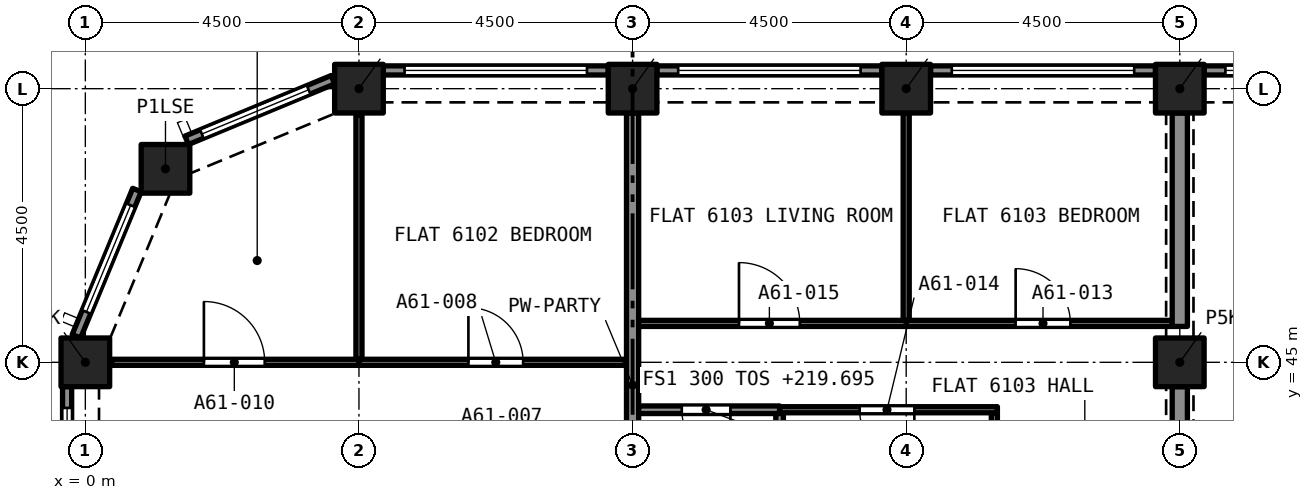
"""IFC4 building model, lengths in metres.
Left out: names, types, materials, properties, quantities, classifications, styles, units other than length and angle.
Written with IfcOpenShell. Run it as: python <this file> out.ifc"""

import sys

from ifc_helpers import new_model, si_unit, direction, frame, frame_2d, origin, origin_2d, place, context, subcontext, project, spatial, rectangle, extrude, element, fill, save


model = new_model("IFC4")
c1 = context("Model", 3, precision=1e-05, world=origin(), true_north=direction((0.0, 1.0)))
c2 = subcontext(c1, "Body", "Model", "MODEL_VIEW")
j1 = project(units=[si_unit("LENGTHUNIT", "METRE"), si_unit("PLANEANGLEUNIT", "RADIAN")], contexts=[c1])
p1 = place(None, origin())
s1 = spatial("IfcSite", under=j1, at=p1, CompositionType="ELEMENT")
p2 = place(p1, origin())
s2 = spatial("IfcBuilding", under=s1, at=p2, CompositionType="ELEMENT")
p3 = place(p2, frame((0.0, 0.0, 219.695)))
s3 = spatial("IfcBuildingStorey", under=s2, at=p3, CompositionType="ELEMENT", Elevation=219.695)
for number, where, z_axis, x_axis in (
    (1, (0.0, 45.0, 0.0), (0.0, 0.0, 1.0), (1.0, 0.0, 0.0)),
    (2, (18.0, 45.0, 0.0), (0.0, 0.0, 1.0), (1.0, 0.0, 0.0)),
    (3, (1.318, 48.182, 0.0), (0.0, 0.0, 1.0), (1.0, 0.0, 0.0)),
    (4, (4.5, 49.5, 0.0), (0.0, 0.0, 1.0), (1.0, 0.0, 0.0)),
    (5, (9.0, 49.5, 0.0), (0.0, 0.0, 1.0), (1.0, 0.0, 0.0)),
    (6, (13.5, 49.5, 0.0), (0.0, 0.0, 1.0), (1.0, 0.0, 0.0)),
    (7, (18.0, 49.5, 0.0), (0.0, 0.0, 1.0), (1.0, 0.0, 0.0)),
):
    element("IfcColumn", number, at=place(p3, frame(where, z_axis=z_axis, x_axis=x_axis)), inside=s3, PredefinedType="COLUMN", context=c2, shape_type="SweptSolid", body=[
        extrude(rectangle(XDim=0.8, YDim=0.8, at=origin_2d()), origin(), (0.0, 0.0, 1.0), 3.2),
    ])
p4 = place(p3, frame((18.4, 49.8, 0.0), z_axis=(0.0, 0.0, 1.0), x_axis=(1.0, 0.0, 0.0)))
e8 = element("IfcWall", 8, at=p4, inside=s3, PredefinedType="SOLIDWALL", context=c2, shape_type="SweptSolid", body=[
    extrude(rectangle(XDim=3.7, YDim=0.15, at=frame_2d((1.85, 0.0))), origin(), (0.0, 0.0, 1.0), 3.2),
])
p5 = place(p4, frame((0.35, 0.0, 0.45)))
e9 = element("IfcOpeningElement", 9, at=p5, cuts=e8, PredefinedType="OPENING", context=c2, shape_type="SweptSolid", body=[
    extrude(rectangle(XDim=3.0, YDim=1.95, at=frame_2d((1.5, 0.975))), frame((0.0, 0.085, 0.0), z_axis=(0.0, -1.0, 0.0), x_axis=(1.0, 0.0, 0.0)), (0.0, 0.0, 1.0), 0.17),
])
p6 = place(p3, frame((13.9, 49.8, 0.0), z_axis=(0.0, 0.0, 1.0), x_axis=(1.0, 0.0, 0.0)))
e10 = element("IfcWall", 10, at=p6, inside=s3, PredefinedType="SOLIDWALL", context=c2, shape_type="SweptSolid", body=[
    extrude(rectangle(XDim=3.7, YDim=0.15, at=frame_2d((1.85, 0.0))), origin(), (0.0, 0.0, 1.0), 3.2),
])
p7 = place(p6, frame((0.35, 0.0, 0.45)))
e11 = element("IfcOpeningElement", 11, at=p7, cuts=e10, PredefinedType="OPENING", context=c2, shape_type="SweptSolid", body=[
    extrude(rectangle(XDim=3.0, YDim=1.95, at=frame_2d((1.5, 0.975))), frame((0.0, 0.085, 0.0), z_axis=(0.0, -1.0, 0.0), x_axis=(1.0, 0.0, 0.0)), (0.0, 0.0, 1.0), 0.17),
])
p8 = place(p3, frame((9.4, 49.8, 0.0), z_axis=(0.0, 0.0, 1.0), x_axis=(1.0, 0.0, 0.0)))
e12 = element("IfcWall", 12, at=p8, inside=s3, PredefinedType="SOLIDWALL", context=c2, shape_type="SweptSolid", body=[
    extrude(rectangle(XDim=3.7, YDim=0.15, at=frame_2d((1.85, 0.0))), origin(), (0.0, 0.0, 1.0), 3.2),
])
p9 = place(p8, frame((0.35, 0.0, 0.45)))
e13 = element("IfcOpeningElement", 13, at=p9, cuts=e12, PredefinedType="OPENING", context=c2, shape_type="SweptSolid", body=[
    extrude(rectangle(XDim=3.0, YDim=1.95, at=frame_2d((1.5, 0.975))), frame((0.0, 0.085, 0.0), z_axis=(0.0, -1.0, 0.0), x_axis=(1.0, 0.0, 0.0)), (0.0, 0.0, 1.0), 0.17),
])
p10 = place(p3, frame((4.9, 49.8, 0.0), z_axis=(0.0, 0.0, 1.0), x_axis=(1.0, 0.0, 0.0)))
e14 = element("IfcWall", 14, at=p10, inside=s3, PredefinedType="SOLIDWALL", context=c2, shape_type="SweptSolid", body=[
    extrude(rectangle(XDim=3.7, YDim=0.15, at=frame_2d((1.85, 0.0))), origin(), (0.0, 0.0, 1.0), 3.2),
])
p11 = place(p10, frame((0.35, 0.0, 0.45)))
e15 = element("IfcOpeningElement", 15, at=p11, cuts=e14, PredefinedType="OPENING", context=c2, shape_type="SweptSolid", body=[
    extrude(rectangle(XDim=3.0, YDim=1.95, at=frame_2d((1.5, 0.975))), frame((0.0, 0.085, 0.0), z_axis=(0.0, -1.0, 0.0), x_axis=(1.0, 0.0, 0.0)), (0.0, 0.0, 1.0), 0.17),
])
p12 = place(p3, frame((1.667, 48.651, 0.0), z_axis=(0.0, 0.0, 1.0), x_axis=(0.923885342263, 0.382669406082, 0.0)))
e16 = element("IfcWall", 16, at=p12, inside=s3, PredefinedType="SOLIDWALL", context=c2, shape_type="SweptSolid", body=[
    extrude(rectangle(XDim=2.602, YDim=0.15, at=frame_2d((1.301, 0.0))), origin(), (0.0, 0.0, 1.0), 3.2),
])
p13 = place(p12, frame((0.27, 0.0, 0.45)))
e17 = element("IfcOpeningElement", 17, at=p13, cuts=e16, PredefinedType="OPENING", context=c2, shape_type="SweptSolid", body=[
    extrude(rectangle(XDim=1.9, YDim=1.95, at=frame_2d((0.95, 0.975))), frame((0.0, 0.085, 0.0), z_axis=(0.0, -1.0, 0.0), x_axis=(1.0, 0.0, 0.0)), (0.0, 0.0, 1.0), 0.17),
])
p14 = place(p3, frame((-0.147, 45.429, 0.0), z_axis=(0.0, 0.0, 1.0), x_axis=(0.382669406082, 0.923885342263, 0.0)))
e18 = element("IfcWall", 18, at=p14, inside=s3, PredefinedType="SOLIDWALL", context=c2, shape_type="SweptSolid", body=[
    extrude(rectangle(XDim=2.602, YDim=0.15, at=frame_2d((1.301, 0.0))), origin(), (0.0, 0.0, 1.0), 3.2),
])
p15 = place(p14, frame((0.432, 0.0, 0.45)))
e19 = element("IfcOpeningElement", 19, at=p15, cuts=e18, PredefinedType="OPENING", context=c2, shape_type="SweptSolid", body=[
    extrude(rectangle(XDim=1.9, YDim=1.95, at=frame_2d((0.95, 0.975))), frame((0.0, 0.085, 0.0), z_axis=(0.0, -1.0, 0.0), x_axis=(1.0, 0.0, 0.0)), (0.0, 0.0, 1.0), 0.17),
])
p16 = place(p3, frame((-0.3, 40.9, 0.0), z_axis=(0.0, 0.0, 1.0), x_axis=(0.0, 1.0, 0.0)))
e20 = element("IfcWall", 20, at=p16, inside=s3, PredefinedType="SOLIDWALL", context=c2, shape_type="SweptSolid", body=[
    extrude(rectangle(XDim=3.7, YDim=0.15, at=frame_2d((1.85, 0.0))), origin(), (0.0, 0.0, 1.0), 3.2),
])
p17 = place(p16, frame((0.35, 0.0, 0.45)))
e21 = element("IfcOpeningElement", 21, at=p17, cuts=e20, PredefinedType="OPENING", context=c2, shape_type="SweptSolid", body=[
    extrude(rectangle(XDim=3.0, YDim=1.95, at=frame_2d((1.5, 0.975))), frame((0.0, 0.085, 0.0), z_axis=(0.0, -1.0, 0.0), x_axis=(1.0, 0.0, 0.0)), (0.0, 0.0, 1.0), 0.17),
])
p18 = place(p3, frame((4.5, 45.0, 0.0), z_axis=(0.0, 0.0, 1.0), x_axis=(1.0, 0.0, 0.0)))
e22 = element("IfcWall", 22, at=p18, inside=s3, PredefinedType="PARTITIONING", context=c2, shape_type="SweptSolid", body=[
    extrude(rectangle(XDim=4.4, YDim=0.1, at=frame_2d((2.2, 0.0))), origin(), (0.0, 0.0, 1.0), 2.9),
])
p19 = place(p18, frame((1.8, 0.0, 0.0)))
e23 = element("IfcOpeningElement", 23, at=p19, cuts=e22, PredefinedType="OPENING", context=c2, shape_type="SweptSolid", body=[
    extrude(rectangle(XDim=0.9, YDim=2.1, at=frame_2d((0.45, 1.05))), frame((0.0, 0.06, 0.0), z_axis=(0.0, -1.0, 0.0), x_axis=(1.0, 0.0, 0.0)), (0.0, 0.0, 1.0), 0.12),
])
p20 = place(p3, frame((4.5, 45.05, 0.0), z_axis=(0.0, 0.0, 1.0), x_axis=(0.0, 1.0, 0.0)))
e24 = element("IfcWall", 24, at=p20, inside=s3, PredefinedType="PARTITIONING", context=c2, shape_type="SweptSolid", body=[
    extrude(rectangle(XDim=4.017, YDim=0.1, at=frame_2d((2.009, 0.0))), origin(), (0.0, 0.0, 1.0), 2.9),
])
p21 = place(p3, frame((0.433, 45.0, 0.0), z_axis=(0.0, 0.0, 1.0), x_axis=(1.0, 0.0, 0.0)))
e25 = element("IfcWall", 25, at=p21, inside=s3, PredefinedType="PARTITIONING", context=c2, shape_type="SweptSolid", body=[
    extrude(rectangle(XDim=4.067, YDim=0.1, at=frame_2d((2.034, 0.0))), origin(), (0.0, 0.0, 1.0), 2.9),
])
p22 = place(p21, frame((1.517, 0.0, 0.0)))
e26 = element("IfcOpeningElement", 26, at=p22, cuts=e25, PredefinedType="OPENING", context=c2, shape_type="SweptSolid", body=[
    extrude(rectangle(XDim=1.0, YDim=2.1, at=frame_2d((0.5, 1.05))), frame((0.0, 0.06, 0.0), z_axis=(0.0, -1.0, 0.0), x_axis=(1.0, 0.0, 0.0)), (0.0, 0.0, 1.0), 0.12),
])
p23 = place(p3, frame((9.0, 40.15, 0.0), z_axis=(0.0, 0.0, 1.0), x_axis=(0.0, 1.0, 0.0)))
e27 = element("IfcWall", 27, at=p23, inside=s3, PredefinedType="PARTITIONING", context=c2, shape_type="SweptSolid", body=[
    extrude(rectangle(XDim=8.95, YDim=0.2, at=frame_2d((4.475, 0.0))), origin(), (0.0, 0.0, 1.0), 2.9),
])
p24 = place(p3, frame((11.418, 44.22, 0.0), z_axis=(0.0, 0.0, 1.0), x_axis=(-1.0, 0.0, 0.0)))
e28 = element("IfcWall", 28, at=p24, inside=s3, PredefinedType="PARTITIONING", context=c2, shape_type="SweptSolid", body=[
    extrude(rectangle(XDim=2.318, YDim=0.125, at=frame_2d((1.159, 0.0))), origin(), (0.0, 0.0, 1.0), 2.9),
])
p25 = place(p24, frame((0.809, 0.0, 0.0)))
e29 = element("IfcOpeningElement", 29, at=p25, cuts=e28, PredefinedType="OPENING", context=c2, shape_type="SweptSolid", body=[
    extrude(rectangle(XDim=0.8, YDim=2.1, at=frame_2d((0.4, 1.05))), frame((0.0, 0.073, 0.0), z_axis=(0.0, -1.0, 0.0), x_axis=(1.0, 0.0, 0.0)), (0.0, 0.0, 1.0), 0.145),
])
p26 = place(p3, frame((11.418, 40.15, 0.0), z_axis=(0.0, 0.0, 1.0), x_axis=(0.0, 1.0, 0.0)))
e30 = element("IfcWall", 30, at=p26, inside=s3, PredefinedType="PARTITIONING", context=c2, shape_type="SweptSolid", body=[
    extrude(rectangle(XDim=4.008, YDim=0.125, at=frame_2d((2.004, 0.0))), origin(), (0.0, 0.0, 1.0), 2.9),
])
p27 = place(p3, frame((13.5, 45.64, 0.0), z_axis=(0.0, 0.0, 1.0), x_axis=(1.0, 0.0, 0.0)))
e31 = element("IfcWall", 31, at=p27, inside=s3, PredefinedType="PARTITIONING", context=c2, shape_type="SweptSolid", body=[
    extrude(rectangle(XDim=4.375, YDim=0.1, at=frame_2d((2.188, 0.0))), origin(), (0.0, 0.0, 1.0), 2.9),
])
p28 = place(p27, frame((1.8, 0.0, 0.0)))
e32 = element("IfcOpeningElement", 32, at=p28, cuts=e31, PredefinedType="OPENING", context=c2, shape_type="SweptSolid", body=[
    extrude(rectangle(XDim=0.9, YDim=2.1, at=frame_2d((0.45, 1.05))), frame((0.0, 0.06, 0.0), z_axis=(0.0, -1.0, 0.0), x_axis=(1.0, 0.0, 0.0)), (0.0, 0.0, 1.0), 0.12),
])
p29 = place(p3, frame((13.5, 45.69, 0.0), z_axis=(0.0, 0.0, 1.0), x_axis=(0.0, 1.0, 0.0)))
e33 = element("IfcWall", 33, at=p29, inside=s3, PredefinedType="PARTITIONING", context=c2, shape_type="SweptSolid", body=[
    extrude(rectangle(XDim=3.41, YDim=0.1, at=frame_2d((1.705, 0.0))), origin(), (0.0, 0.0, 1.0), 2.9),
])
p30 = place(p3, frame((18.0, 45.59, 0.0), z_axis=(0.0, 0.0, 1.0), x_axis=(0.0, 1.0, 0.0)))
e34 = element("IfcWall", 34, at=p30, inside=s3, PredefinedType="PARTITIONING", context=c2, shape_type="SweptSolid", body=[
    extrude(rectangle(XDim=3.51, YDim=0.25, at=frame_2d((1.755, 0.0))), origin(), (0.0, 0.0, 1.0), 2.38),
])
p31 = place(p3, frame((14.95, 40.225, 0.0), z_axis=(0.0, 0.0, 1.0), x_axis=(0.0, 1.0, 0.0)))
e35 = element("IfcWall", 35, at=p31, inside=s3, PredefinedType="PARTITIONING", context=c2, shape_type="SweptSolid", body=[
    extrude(rectangle(XDim=3.945, YDim=0.1, at=frame_2d((1.972, 0.0))), origin(), (0.0, 0.0, 1.0), 2.9),
])
p32 = place(p3, frame((15.0, 44.22, 0.0), z_axis=(0.0, 0.0, 1.0), x_axis=(-1.0, 0.0, 0.0)))
e36 = element("IfcWall", 36, at=p32, inside=s3, PredefinedType="PARTITIONING", context=c2, shape_type="SweptSolid", body=[
    extrude(rectangle(XDim=3.582, YDim=0.1, at=frame_2d((1.791, 0.0))), origin(), (0.0, 0.0, 1.0), 2.9),
])
p33 = place(p32, frame((1.366, 0.0, 0.0)))
e37 = element("IfcOpeningElement", 37, at=p33, cuts=e36, PredefinedType="OPENING", context=c2, shape_type="SweptSolid", body=[
    extrude(rectangle(XDim=0.9, YDim=2.1, at=frame_2d((0.45, 1.05))), frame((0.0, 0.06, 0.0), z_axis=(0.0, -1.0, 0.0), x_axis=(1.0, 0.0, 0.0)), (0.0, 0.0, 1.0), 0.12),
])
p34 = place(p3, frame((9.1, 45.64, 0.0), z_axis=(0.0, 0.0, 1.0), x_axis=(1.0, 0.0, 0.0)))
e38 = element("IfcWall", 38, at=p34, inside=s3, PredefinedType="PARTITIONING", context=c2, shape_type="SweptSolid", body=[
    extrude(rectangle(XDim=4.4, YDim=0.1, at=frame_2d((2.2, 0.0))), origin(), (0.0, 0.0, 1.0), 2.9),
])
p35 = place(p34, frame((1.65, 0.0, 0.0)))
e39 = element("IfcOpeningElement", 39, at=p35, cuts=e38, PredefinedType="OPENING", context=c2, shape_type="SweptSolid", body=[
    extrude(rectangle(XDim=1.0, YDim=2.1, at=frame_2d((0.5, 1.05))), frame((0.0, 0.06, 0.0), z_axis=(0.0, -1.0, 0.0), x_axis=(1.0, 0.0, 0.0)), (0.0, 0.0, 1.0), 0.12),
])
p36 = place(p3, frame((18.0, 40.9, 0.0), z_axis=(0.0, 0.0, 1.0), x_axis=(0.0, 1.0, 0.0)))
e40 = element("IfcWall", 40, at=p36, inside=s3, PredefinedType="PARTITIONING", context=c2, shape_type="SweptSolid", body=[
    extrude(rectangle(XDim=3.7, YDim=0.25, at=frame_2d((1.85, 0.0))), origin(), (0.0, 0.0, 1.0), 2.38),
])
p37 = place(p5, origin())
e41 = element("IfcWindow", 41, at=p37, inside=s3, PartitioningType="SINGLE_PANEL", PredefinedType="WINDOW", context=c2, shape_type="SweptSolid", body=[
    extrude(rectangle(XDim=3.0, YDim=1.95, at=frame_2d((1.5, 0.975))), frame((0.0, 0.03, 0.0), z_axis=(0.0, -1.0, 0.0), x_axis=(1.0, 0.0, 0.0)), (0.0, 0.0, 1.0), 0.06),
])
fill(e9, e41)
p38 = place(p7, origin())
e42 = element("IfcWindow", 42, at=p38, inside=s3, PartitioningType="SINGLE_PANEL", PredefinedType="WINDOW", context=c2, shape_type="SweptSolid", body=[
    extrude(rectangle(XDim=3.0, YDim=1.95, at=frame_2d((1.5, 0.975))), frame((0.0, 0.03, 0.0), z_axis=(0.0, -1.0, 0.0), x_axis=(1.0, 0.0, 0.0)), (0.0, 0.0, 1.0), 0.06),
])
fill(e11, e42)
p39 = place(p9, origin())
e43 = element("IfcWindow", 43, at=p39, inside=s3, PartitioningType="SINGLE_PANEL", PredefinedType="WINDOW", context=c2, shape_type="SweptSolid", body=[
    extrude(rectangle(XDim=3.0, YDim=1.95, at=frame_2d((1.5, 0.975))), frame((0.0, 0.03, 0.0), z_axis=(0.0, -1.0, 0.0), x_axis=(1.0, 0.0, 0.0)), (0.0, 0.0, 1.0), 0.06),
])
fill(e13, e43)
p40 = place(p11, origin())
e44 = element("IfcWindow", 44, at=p40, inside=s3, PartitioningType="SINGLE_PANEL", PredefinedType="WINDOW", context=c2, shape_type="SweptSolid", body=[
    extrude(rectangle(XDim=3.0, YDim=1.95, at=frame_2d((1.5, 0.975))), frame((0.0, 0.03, 0.0), z_axis=(0.0, -1.0, 0.0), x_axis=(1.0, 0.0, 0.0)), (0.0, 0.0, 1.0), 0.06),
])
fill(e15, e44)
p41 = place(p13, origin())
e45 = element("IfcWindow", 45, at=p41, inside=s3, PartitioningType="SINGLE_PANEL", PredefinedType="WINDOW", context=c2, shape_type="SweptSolid", body=[
    extrude(rectangle(XDim=1.9, YDim=1.95, at=frame_2d((0.95, 0.975))), frame((0.0, 0.03, 0.0), z_axis=(0.0, -1.0, 0.0), x_axis=(1.0, 0.0, 0.0)), (0.0, 0.0, 1.0), 0.06),
])
fill(e17, e45)
p42 = place(p15, origin())
e46 = element("IfcWindow", 46, at=p42, inside=s3, PartitioningType="SINGLE_PANEL", PredefinedType="WINDOW", context=c2, shape_type="SweptSolid", body=[
    extrude(rectangle(XDim=1.9, YDim=1.95, at=frame_2d((0.95, 0.975))), frame((0.0, 0.03, 0.0), z_axis=(0.0, -1.0, 0.0), x_axis=(1.0, 0.0, 0.0)), (0.0, 0.0, 1.0), 0.06),
])
fill(e19, e46)
p43 = place(p17, origin())
e47 = element("IfcWindow", 47, at=p43, inside=s3, PartitioningType="SINGLE_PANEL", PredefinedType="WINDOW", context=c2, shape_type="SweptSolid", body=[
    extrude(rectangle(XDim=3.0, YDim=1.95, at=frame_2d((1.5, 0.975))), frame((0.0, 0.03, 0.0), z_axis=(0.0, -1.0, 0.0), x_axis=(1.0, 0.0, 0.0)), (0.0, 0.0, 1.0), 0.06),
])
fill(e21, e47)
p44 = place(p19, origin())
e48 = element("IfcDoor", 48, at=p44, inside=s3, OperationType="SINGLE_SWING_RIGHT", PredefinedType="DOOR", context=c2, shape_type="SweptSolid", body=[
    extrude(rectangle(XDim=0.9, YDim=2.1, at=frame_2d((0.45, 1.05))), frame((0.0, 0.025, 0.0), z_axis=(0.0, -1.0, 0.0), x_axis=(1.0, 0.0, 0.0)), (0.0, 0.0, 1.0), 0.05),
])
fill(e23, e48)
p45 = place(p22, origin())
e49 = element("IfcDoor", 49, at=p45, inside=s3, OperationType="SINGLE_SWING_LEFT", PredefinedType="DOOR", context=c2, shape_type="SweptSolid", body=[
    extrude(rectangle(XDim=1.0, YDim=2.1, at=frame_2d((0.5, 1.05))), frame((0.0, 0.025, 0.0), z_axis=(0.0, -1.0, 0.0), x_axis=(1.0, 0.0, 0.0)), (0.0, 0.0, 1.0), 0.05),
])
fill(e26, e49)
p46 = place(p25, origin())
e50 = element("IfcDoor", 50, at=p46, inside=s3, OperationType="SINGLE_SWING_RIGHT", PredefinedType="DOOR", context=c2, shape_type="SweptSolid", body=[
    extrude(rectangle(XDim=0.8, YDim=2.1, at=frame_2d((0.4, 1.05))), frame((0.0, 0.025, 0.0), z_axis=(0.0, -1.0, 0.0), x_axis=(1.0, 0.0, 0.0)), (0.0, 0.0, 1.0), 0.05),
])
fill(e29, e50)
p47 = place(p28, origin())
e51 = element("IfcDoor", 51, at=p47, inside=s3, OperationType="SINGLE_SWING_RIGHT", PredefinedType="DOOR", context=c2, shape_type="SweptSolid", body=[
    extrude(rectangle(XDim=0.9, YDim=2.1, at=frame_2d((0.45, 1.05))), frame((0.0, 0.025, 0.0), z_axis=(0.0, -1.0, 0.0), x_axis=(1.0, 0.0, 0.0)), (0.0, 0.0, 1.0), 0.05),
])
fill(e32, e51)
p48 = place(p33, origin())
e52 = element("IfcDoor", 52, at=p48, inside=s3, OperationType="SINGLE_SWING_RIGHT", PredefinedType="DOOR", context=c2, shape_type="SweptSolid", body=[
    extrude(rectangle(XDim=0.9, YDim=2.1, at=frame_2d((0.45, 1.05))), frame((0.0, 0.025, 0.0), z_axis=(0.0, -1.0, 0.0), x_axis=(1.0, 0.0, 0.0)), (0.0, 0.0, 1.0), 0.05),
])
fill(e37, e52)
p49 = place(p35, origin())
e53 = element("IfcDoor", 53, at=p49, inside=s3, OperationType="SINGLE_SWING_LEFT", PredefinedType="DOOR", context=c2, shape_type="SweptSolid", body=[
    extrude(rectangle(XDim=1.0, YDim=2.1, at=frame_2d((0.5, 1.05))), frame((0.0, 0.025, 0.0), z_axis=(0.0, -1.0, 0.0), x_axis=(1.0, 0.0, 0.0)), (0.0, 0.0, 1.0), 0.05),
])
fill(e39, e53)
save(model, sys.argv[1])
